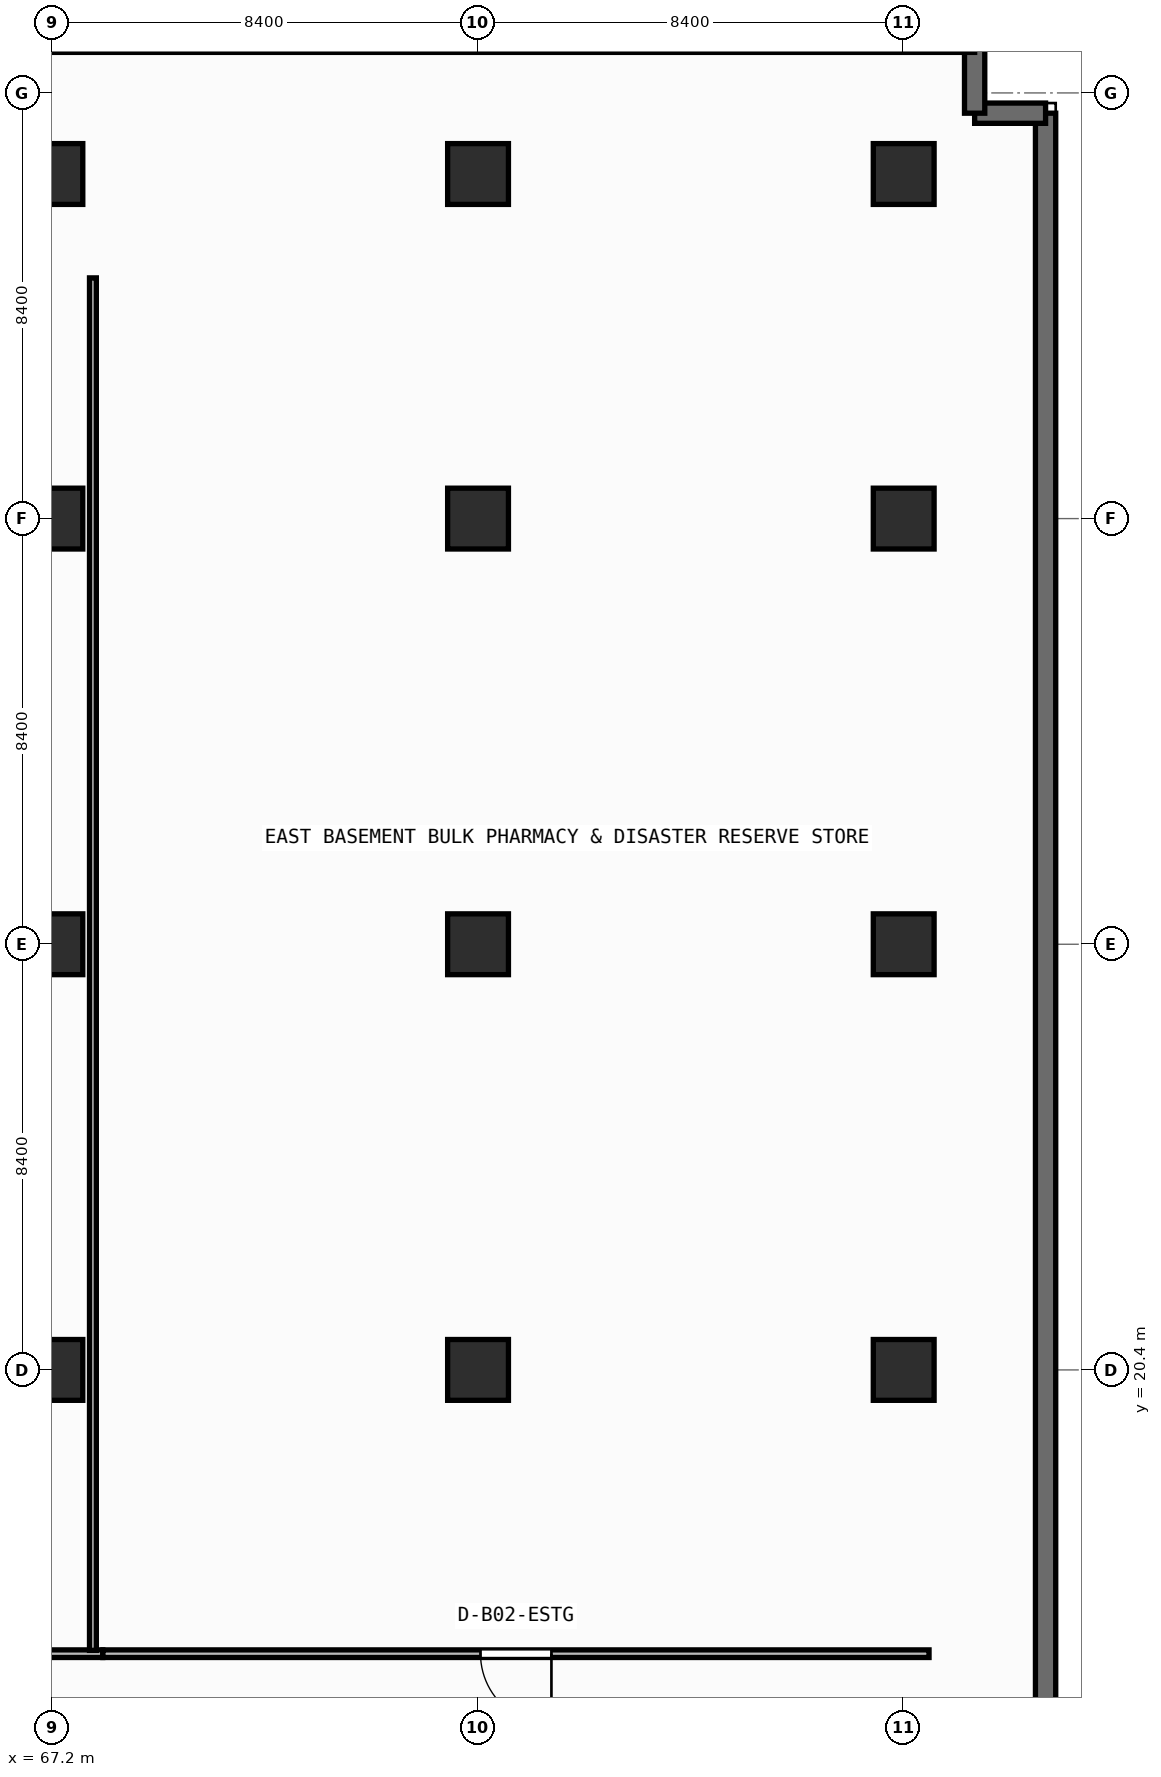
"""IFC4 building model, lengths in metres.
Left out: names, types, materials, properties, quantities, classifications, styles, units other than length and angle.
Written with IfcOpenShell. Run it as: python <this file> out.ifc"""

import sys

from ifc_helpers import new_model, si_unit, direction, frame, frame_2d, origin, origin_2d, place, context, subcontext, project, spatial, rectangle, circle, extrude, element, fill, save


model = new_model("IFC4")
c1 = context("Model", 3, precision=1e-05, world=origin(), true_north=direction((0.0, 1.0)))
c2 = subcontext(c1, "Body", "Model", "MODEL_VIEW")
j1 = project(units=[si_unit("LENGTHUNIT", "METRE"), si_unit("PLANEANGLEUNIT", "RADIAN")], contexts=[c1])
p1 = place(None, origin())
s1 = spatial("IfcSite", under=j1, at=p1, CompositionType="ELEMENT")
p2 = place(p1, origin())
s2 = spatial("IfcBuilding", under=s1, at=p2, CompositionType="ELEMENT")
p3 = place(p2, frame((0.0, 0.0, -9.0)))
s3 = spatial("IfcBuildingStorey", under=s2, at=p3, CompositionType="ELEMENT", Elevation=-9.0)
for number, where, z_axis, x_axis in (
    (1, (67.2, 20.4, 0.0), (0.0, 0.0, 1.0), (1.0, 0.0, 0.0)),
    (2, (75.6, 20.4, 0.0), (0.0, 0.0, 1.0), (1.0, 0.0, 0.0)),
    (3, (84.0, 20.4, 0.0), (0.0, 0.0, 1.0), (1.0, 0.0, 0.0)),
):
    element("IfcColumn", number, at=place(p3, frame(where, z_axis=z_axis, x_axis=x_axis)), inside=s3, PredefinedType="COLUMN", context=c2, shape_type="SweptSolid", body=[
        extrude(rectangle(XDim=1.2, YDim=1.2, at=origin_2d()), origin(), (0.0, 0.0, 1.0), 4.5),
    ])
for number, where, z_axis, x_axis in (
    (4, (67.2, 28.8, 0.0), (0.0, 0.0, 1.0), (1.0, 0.0, 0.0)),
    (5, (75.6, 28.8, 0.0), (0.0, 0.0, 1.0), (1.0, 0.0, 0.0)),
    (6, (84.0, 28.8, 0.0), (0.0, 0.0, 1.0), (1.0, 0.0, 0.0)),
    (7, (67.2, 37.2, 0.0), (0.0, 0.0, 1.0), (1.0, 0.0, 0.0)),
    (8, (75.6, 37.2, 0.0), (0.0, 0.0, 1.0), (1.0, 0.0, 0.0)),
    (9, (84.0, 37.2, 0.0), (0.0, 0.0, 1.0), (1.0, 0.0, 0.0)),
    (10, (67.2, 44.0, 0.0), (0.0, 0.0, 1.0), (1.0, 0.0, 0.0)),
    (11, (75.6, 44.0, 0.0), (0.0, 0.0, 1.0), (1.0, 0.0, 0.0)),
    (12, (84.0, 44.0, 0.0), (0.0, 0.0, 1.0), (1.0, 0.0, 0.0)),
):
    element("IfcColumn", number, at=place(p3, frame(where, z_axis=z_axis, x_axis=x_axis)), inside=s3, PredefinedType="COLUMN", context=c2, shape_type="SweptSolid", body=[
        extrude(circle(Radius=0.6, at=origin_2d()), origin(), (0.0, 0.0, 1.0), 4.5),
    ])
p4 = place(p3, frame((86.8, 0.8, 0.0), z_axis=(0.0, 0.0, 1.0), x_axis=(0.0, 1.0, 0.0)))
e13 = element("IfcWall", 13, at=p4, inside=s3, PredefinedType="STANDARD", context=c2, shape_type="SweptSolid", body=[
    extrude(rectangle(XDim=44.4, YDim=0.4, at=frame_2d((22.2, 0.0))), origin(), (0.0, 0.0, 1.0), 4.24),
])
for number, where, z_axis, x_axis in (
    (14, (86.8, 45.2, 0.0), (0.0, 0.0, 1.0), (-1.0, 0.0, 0.0)),
    (15, (85.4, 45.2, 0.0), (0.0, 0.0, 1.0), (0.0, 1.0, 0.0)),
):
    element("IfcWall", number, at=place(p3, frame(where, z_axis=z_axis, x_axis=x_axis)), inside=s3, PredefinedType="STANDARD", context=c2, shape_type="SweptSolid", body=[
        extrude(rectangle(XDim=1.4, YDim=0.4, at=frame_2d((0.7, 0.0))), origin(), (0.0, 0.0, 1.0), 4.24),
    ])
p5 = place(p3, frame((68.195, 14.8, 0.0), z_axis=(0.0, 0.0, 1.0), x_axis=(-1.0, 0.0, 0.0)))
e16 = element("IfcWall", 16, at=p5, inside=s3, PredefinedType="PARTITIONING", context=c2, shape_type="SweptSolid", body=[
    extrude(rectangle(XDim=12.139, YDim=0.15, at=frame_2d((6.07, 0.0))), origin(), (0.0, 0.0, 1.0), 4.24),
])
p6 = place(p5, frame((5.37, 0.0, 0.0)))
e17 = element("IfcOpeningElement", 17, at=p6, cuts=e16, PredefinedType="OPENING", context=c2, shape_type="SweptSolid", body=[
    extrude(rectangle(XDim=1.4, YDim=2.15, at=frame_2d((0.7, 1.075))), frame((0.0, 0.085, 0.0), z_axis=(0.0, -1.0, 0.0), x_axis=(1.0, 0.0, 0.0)), (0.0, 0.0, 1.0), 0.17),
])
p7 = place(p3, frame((84.5, 14.8, 0.0), z_axis=(0.0, 0.0, 1.0), x_axis=(-1.0, 0.0, 0.0)))
e18 = element("IfcWall", 18, at=p7, inside=s3, PredefinedType="PARTITIONING", context=c2, shape_type="SweptSolid", body=[
    extrude(rectangle(XDim=16.303, YDim=0.15, at=frame_2d((8.152, 0.0))), origin(), (0.0, 0.0, 1.0), 4.24),
])
p8 = place(p7, frame((7.452, 0.0, 0.0)))
e19 = element("IfcOpeningElement", 19, at=p8, cuts=e18, PredefinedType="OPENING", context=c2, shape_type="SweptSolid", body=[
    extrude(rectangle(XDim=1.4, YDim=2.15, at=frame_2d((0.7, 1.075))), frame((0.0, 0.085, 0.0), z_axis=(0.0, -1.0, 0.0), x_axis=(1.0, 0.0, 0.0)), (0.0, 0.0, 1.0), 0.17),
])
p9 = place(p3, frame((68.0, 14.865, 0.0), z_axis=(0.0, 0.0, 1.0), x_axis=(0.0, 1.0, 0.0)))
e20 = element("IfcWall", 20, at=p9, inside=s3, PredefinedType="PARTITIONING", context=c2, shape_type="SweptSolid", body=[
    extrude(rectangle(XDim=27.085, YDim=0.135, at=frame_2d((13.542, 0.0))), origin(), (0.0, 0.0, 1.0), 4.24),
])
p10 = place(p8, origin())
e21 = element("IfcDoor", 21, at=p10, inside=s3, OperationType="SINGLE_SWING_LEFT", PredefinedType="DOOR", context=c2, shape_type="SweptSolid", body=[
    extrude(rectangle(XDim=1.4, YDim=2.15, at=frame_2d((0.7, 1.075))), frame((0.0, 0.025, 0.0), z_axis=(0.0, -1.0, 0.0), x_axis=(1.0, 0.0, 0.0)), (0.0, 0.0, 1.0), 0.05),
])
fill(e19, e21)
save(model, sys.argv[1])
